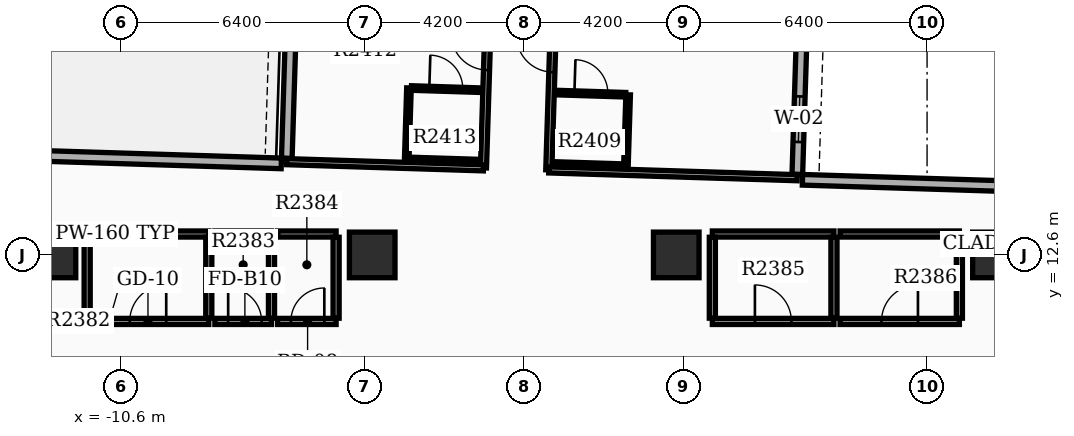
"""IFC4 building model, lengths in metres.
Left out: names, types, materials, properties, quantities, classifications, styles, units other than length and angle.
Written with IfcOpenShell. Run it as: python <this file> out.ifc"""

import sys

from ifc_helpers import new_model, si_unit, direction, frame, frame_2d, origin, origin_2d, place, context, subcontext, project, spatial, rectangle, extrude, element, fill, save


model = new_model("IFC4")
c1 = context("Model", 3, precision=1e-05, world=origin(), true_north=direction((0.0, 1.0)))
c2 = subcontext(c1, "Body", "Model", "MODEL_VIEW")
j1 = project(units=[si_unit("LENGTHUNIT", "METRE"), si_unit("PLANEANGLEUNIT", "RADIAN")], contexts=[c1])
p1 = place(None, origin())
s1 = spatial("IfcSite", under=j1, at=p1, CompositionType="ELEMENT")
p2 = place(p1, origin())
s2 = spatial("IfcBuilding", under=s1, at=p2, CompositionType="ELEMENT")
p3 = place(p2, frame((0.0, 0.0, 152.7)))
s3 = spatial("IfcBuildingStorey", under=s2, at=p3, CompositionType="ELEMENT", Elevation=152.7)
for number, where, z_axis, x_axis in (
    (1, (12.4, 12.6, 0.0), (0.0, 0.0, 1.0), (1.0, 0.0, 0.0)),
    (2, (-12.4, 12.6, 0.0), (0.0, 0.0, 1.0), (1.0, 0.0, 0.0)),
    (3, (4.0, 12.6, 0.0), (0.0, 0.0, 1.0), (1.0, 0.0, 0.0)),
    (4, (-4.0, 12.6, 0.0), (0.0, 0.0, 1.0), (1.0, 0.0, 0.0)),
):
    element("IfcColumn", number, at=place(p3, frame(where, z_axis=z_axis, x_axis=x_axis)), inside=s3, PredefinedType="COLUMN", context=c2, shape_type="SweptSolid", body=[
        extrude(rectangle(XDim=1.2, YDim=1.2, at=origin_2d()), origin(), (0.0, 0.0, 1.0), 3.9),
    ])
p4 = place(p3, frame((7.186, 14.721, 0.0), z_axis=(0.0, 0.0, 1.0), x_axis=(0.031410322165, 0.999506574096, 0.0)))
e5 = element("IfcWall", 5, at=p4, inside=s3, PredefinedType="STANDARD", context=c2, shape_type="SweptSolid", body=[
    extrude(rectangle(XDim=20.1, YDim=0.28, at=frame_2d((10.05, 0.0))), origin(), (0.0, 0.0, 1.0), 2.97),
])
p5 = place(p4, frame((0.85, 0.0, 0.8)))
e6 = element("IfcOpeningElement", 6, at=p5, cuts=e5, PredefinedType="OPENING", context=c2, shape_type="SweptSolid", body=[
    extrude(rectangle(XDim=1.2, YDim=1.6, at=frame_2d((0.6, 0.8))), frame((0.0, 0.15, 0.0), z_axis=(0.0, -1.0, 0.0), x_axis=(1.0, 0.0, 0.0)), (0.0, 0.0, 1.0), 0.3),
])
p6 = place(p4, frame((4.05, 0.0, 0.8)))
e7 = element("IfcOpeningElement", 7, at=p6, cuts=e5, PredefinedType="OPENING", context=c2, shape_type="SweptSolid", body=[
    extrude(rectangle(XDim=1.2, YDim=1.6, at=frame_2d((0.6, 0.8))), frame((0.0, 0.15, 0.0), z_axis=(0.0, -1.0, 0.0), x_axis=(1.0, 0.0, 0.0)), (0.0, 0.0, 1.0), 0.3),
])
p7 = place(p4, frame((7.25, 0.0, 0.8)))
e8 = element("IfcOpeningElement", 8, at=p7, cuts=e5, PredefinedType="OPENING", context=c2, shape_type="SweptSolid", body=[
    extrude(rectangle(XDim=1.2, YDim=1.6, at=frame_2d((0.6, 0.8))), frame((0.0, 0.15, 0.0), z_axis=(0.0, -1.0, 0.0), x_axis=(1.0, 0.0, 0.0)), (0.0, 0.0, 1.0), 0.3),
])
p8 = place(p4, frame((10.45, 0.0, 0.8)))
e9 = element("IfcOpeningElement", 9, at=p8, cuts=e5, PredefinedType="OPENING", context=c2, shape_type="SweptSolid", body=[
    extrude(rectangle(XDim=1.2, YDim=1.6, at=frame_2d((0.6, 0.8))), frame((0.0, 0.15, 0.0), z_axis=(0.0, -1.0, 0.0), x_axis=(1.0, 0.0, 0.0)), (0.0, 0.0, 1.0), 0.3),
])
p9 = place(p3, frame((-5.616, 35.234, 0.0), z_axis=(0.0, 0.0, 1.0), x_axis=(-0.031398187845, -0.999506955354, 0.0)))
e10 = element("IfcWall", 10, at=p9, inside=s3, PredefinedType="STANDARD", context=c2, shape_type="SweptSolid", body=[
    extrude(rectangle(XDim=20.1, YDim=0.28, at=frame_2d((10.05, 0.0))), origin(), (0.0, 0.0, 1.0), 2.97),
])
p10 = place(p9, frame((0.85, 0.0, 0.8)))
e11 = element("IfcOpeningElement", 11, at=p10, cuts=e10, PredefinedType="OPENING", context=c2, shape_type="SweptSolid", body=[
    extrude(rectangle(XDim=1.2, YDim=1.6, at=frame_2d((0.6, 0.8))), frame((0.0, 0.15, 0.0), z_axis=(0.0, -1.0, 0.0), x_axis=(1.0, 0.0, 0.0)), (0.0, 0.0, 1.0), 0.3),
])
p11 = place(p9, frame((4.05, 0.0, 0.8)))
e12 = element("IfcOpeningElement", 12, at=p11, cuts=e10, PredefinedType="OPENING", context=c2, shape_type="SweptSolid", body=[
    extrude(rectangle(XDim=1.2, YDim=1.6, at=frame_2d((0.6, 0.8))), frame((0.0, 0.15, 0.0), z_axis=(0.0, -1.0, 0.0), x_axis=(1.0, 0.0, 0.0)), (0.0, 0.0, 1.0), 0.3),
])
p12 = place(p9, frame((7.25, 0.0, 0.8)))
e13 = element("IfcOpeningElement", 13, at=p12, cuts=e10, PredefinedType="OPENING", context=c2, shape_type="SweptSolid", body=[
    extrude(rectangle(XDim=1.2, YDim=1.6, at=frame_2d((0.6, 0.8))), frame((0.0, 0.15, 0.0), z_axis=(0.0, -1.0, 0.0), x_axis=(1.0, 0.0, 0.0)), (0.0, 0.0, 1.0), 0.3),
])
p13 = place(p9, frame((10.95, 0.0, 0.8)))
e14 = element("IfcOpeningElement", 14, at=p13, cuts=e10, PredefinedType="OPENING", context=c2, shape_type="SweptSolid", body=[
    extrude(rectangle(XDim=1.2, YDim=1.6, at=frame_2d((0.6, 0.8))), frame((0.0, 0.15, 0.0), z_axis=(0.0, -1.0, 0.0), x_axis=(1.0, 0.0, 0.0)), (0.0, 0.0, 1.0), 0.3),
])
p14 = place(p9, frame((15.0, 0.0, 0.0)))
e15 = element("IfcOpeningElement", 15, at=p14, cuts=e10, PredefinedType="OPENING", context=c2, shape_type="SweptSolid", body=[
    extrude(rectangle(XDim=0.96, YDim=2.1, at=frame_2d((0.48, 1.05))), frame((0.0, 0.15, 0.0), z_axis=(0.0, -1.0, 0.0), x_axis=(1.0, 0.0, 0.0)), (0.0, 0.0, 1.0), 0.3),
])
p15 = place(p3, frame((13.618, 14.379, 0.0), z_axis=(0.0, 0.0, 1.0), x_axis=(-0.999507224741, 0.031389611199, 0.0)))
e16 = element("IfcWall", 16, at=p15, inside=s3, PredefinedType="STANDARD", context=c2, shape_type="SweptSolid", body=[
    extrude(rectangle(XDim=6.3, YDim=0.28, at=frame_2d((3.15, 0.0))), origin(), (0.0, 0.0, 1.0), 2.97),
])
p16 = place(p3, frame((-12.689, 15.206, 0.0), z_axis=(0.0, 0.0, 1.0), x_axis=(0.999507262922, -0.031388395416, 0.0)))
e17 = element("IfcWall", 17, at=p16, inside=s3, PredefinedType="STANDARD", context=c2, shape_type="SweptSolid", body=[
    extrude(rectangle(XDim=6.3, YDim=0.28, at=frame_2d((3.15, 0.0))), origin(), (0.0, 0.0, 1.0), 2.97),
])
p17 = place(p3, frame((-11.5, 10.85, 0.0), z_axis=(0.0, 0.0, 1.0), x_axis=(1.0, 0.0, 0.0)))
e18 = element("IfcWall", 18, at=p17, inside=s3, PredefinedType="PARTITIONING", context=c2, shape_type="SweptSolid", body=[
    extrude(rectangle(XDim=3.2, YDim=0.16, at=frame_2d((1.6, 0.0))), origin(), (0.0, 0.0, 1.0), 2.96),
])
p18 = place(p17, frame((1.12, 0.0, 0.0)))
e19 = element("IfcOpeningElement", 19, at=p18, cuts=e18, PredefinedType="OPENING", context=c2, shape_type="SweptSolid", body=[
    extrude(rectangle(XDim=0.96, YDim=2.15, at=frame_2d((0.48, 1.075))), frame((0.0, 0.09, 0.0), z_axis=(0.0, -1.0, 0.0), x_axis=(1.0, 0.0, 0.0)), (0.0, 0.0, 1.0), 0.18),
])
p19 = place(p3, frame((-11.5, 13.15, 0.0), z_axis=(0.0, 0.0, 1.0), x_axis=(1.0, 0.0, 0.0)))
e20 = element("IfcWall", 20, at=p19, inside=s3, PredefinedType="PARTITIONING", context=c2, shape_type="SweptSolid", body=[
    extrude(rectangle(XDim=3.2, YDim=0.16, at=frame_2d((1.6, 0.0))), origin(), (0.0, 0.0, 1.0), 2.96),
])
for number, where, z_axis, x_axis in (
    (21, (-11.5, 10.935, 0.0), (0.0, 0.0, 1.0), (0.0, 1.0, 0.0)),
    (22, (-8.3, 10.935, 0.0), (0.0, 0.0, 1.0), (0.0, 1.0, 0.0)),
):
    element("IfcWall", number, at=place(p3, frame(where, z_axis=z_axis, x_axis=x_axis)), inside=s3, PredefinedType="PARTITIONING", context=c2, shape_type="SweptSolid", body=[
        extrude(rectangle(XDim=2.13, YDim=0.16, at=frame_2d((1.065, 0.0))), origin(), (0.0, 0.0, 1.0), 2.96),
    ])
p20 = place(p3, frame((-8.14, 10.85, 0.0), z_axis=(0.0, 0.0, 1.0), x_axis=(1.0, 0.0, 0.0)))
e23 = element("IfcWall", 23, at=p20, inside=s3, PredefinedType="PARTITIONING", context=c2, shape_type="SweptSolid", body=[
    extrude(rectangle(XDim=1.49, YDim=0.16, at=frame_2d((0.745, 0.0))), origin(), (0.0, 0.0, 1.0), 2.96),
])
p21 = place(p20, frame((0.35, 0.0, 0.0)))
e24 = element("IfcOpeningElement", 24, at=p21, cuts=e23, PredefinedType="OPENING", context=c2, shape_type="SweptSolid", body=[
    extrude(rectangle(XDim=0.88, YDim=2.1, at=frame_2d((0.44, 1.05))), frame((0.0, 0.09, 0.0), z_axis=(0.0, -1.0, 0.0), x_axis=(1.0, 0.0, 0.0)), (0.0, 0.0, 1.0), 0.18),
])
p22 = place(p3, frame((-8.14, 13.15, 0.0), z_axis=(0.0, 0.0, 1.0), x_axis=(1.0, 0.0, 0.0)))
e25 = element("IfcWall", 25, at=p22, inside=s3, PredefinedType="PARTITIONING", context=c2, shape_type="SweptSolid", body=[
    extrude(rectangle(XDim=1.49, YDim=0.16, at=frame_2d((0.745, 0.0))), origin(), (0.0, 0.0, 1.0), 2.96),
])
p23 = place(p3, frame((-6.65, 10.935, 0.0), z_axis=(0.0, 0.0, 1.0), x_axis=(0.0, 1.0, 0.0)))
e26 = element("IfcWall", 26, at=p23, inside=s3, PredefinedType="PARTITIONING", context=c2, shape_type="SweptSolid", body=[
    extrude(rectangle(XDim=2.13, YDim=0.16, at=frame_2d((1.065, 0.0))), origin(), (0.0, 0.0, 1.0), 2.96),
])
p24 = place(p3, frame((-6.49, 10.85, 0.0), z_axis=(0.0, 0.0, 1.0), x_axis=(1.0, 0.0, 0.0)))
e27 = element("IfcWall", 27, at=p24, inside=s3, PredefinedType="PARTITIONING", context=c2, shape_type="SweptSolid", body=[
    extrude(rectangle(XDim=1.54, YDim=0.16, at=frame_2d((0.77, 0.0))), origin(), (0.0, 0.0, 1.0), 2.96),
])
p25 = place(p24, frame((0.35, 0.0, 0.0)))
e28 = element("IfcOpeningElement", 28, at=p25, cuts=e27, PredefinedType="OPENING", context=c2, shape_type="SweptSolid", body=[
    extrude(rectangle(XDim=0.88, YDim=2.15, at=frame_2d((0.44, 1.075))), frame((0.0, 0.09, 0.0), z_axis=(0.0, -1.0, 0.0), x_axis=(1.0, 0.0, 0.0)), (0.0, 0.0, 1.0), 0.18),
])
p26 = place(p3, frame((-6.49, 13.15, 0.0), z_axis=(0.0, 0.0, 1.0), x_axis=(1.0, 0.0, 0.0)))
e29 = element("IfcWall", 29, at=p26, inside=s3, PredefinedType="PARTITIONING", context=c2, shape_type="SweptSolid", body=[
    extrude(rectangle(XDim=1.54, YDim=0.16, at=frame_2d((0.77, 0.0))), origin(), (0.0, 0.0, 1.0), 2.96),
])
p27 = place(p3, frame((-4.95, 10.935, 0.0), z_axis=(0.0, 0.0, 1.0), x_axis=(0.0, 1.0, 0.0)))
e30 = element("IfcWall", 30, at=p27, inside=s3, PredefinedType="PARTITIONING", context=c2, shape_type="SweptSolid", body=[
    extrude(rectangle(XDim=2.13, YDim=0.16, at=frame_2d((1.065, 0.0))), origin(), (0.0, 0.0, 1.0), 2.96),
])
p28 = place(p3, frame((4.95, 10.85, 0.0), z_axis=(0.0, 0.0, 1.0), x_axis=(1.0, 0.0, 0.0)))
e31 = element("IfcWall", 31, at=p28, inside=s3, PredefinedType="PARTITIONING", context=c2, shape_type="SweptSolid", body=[
    extrude(rectangle(XDim=3.2, YDim=0.16, at=frame_2d((1.6, 0.0))), origin(), (0.0, 0.0, 1.0), 2.96),
])
p29 = place(p28, frame((1.12, 0.0, 0.0)))
e32 = element("IfcOpeningElement", 32, at=p29, cuts=e31, PredefinedType="OPENING", context=c2, shape_type="SweptSolid", body=[
    extrude(rectangle(XDim=0.96, YDim=2.15, at=frame_2d((0.48, 1.075))), frame((0.0, 0.09, 0.0), z_axis=(0.0, -1.0, 0.0), x_axis=(1.0, 0.0, 0.0)), (0.0, 0.0, 1.0), 0.18),
])
p30 = place(p3, frame((4.95, 13.15, 0.0), z_axis=(0.0, 0.0, 1.0), x_axis=(1.0, 0.0, 0.0)))
e33 = element("IfcWall", 33, at=p30, inside=s3, PredefinedType="PARTITIONING", context=c2, shape_type="SweptSolid", body=[
    extrude(rectangle(XDim=3.2, YDim=0.16, at=frame_2d((1.6, 0.0))), origin(), (0.0, 0.0, 1.0), 2.96),
])
for number, where, z_axis, x_axis in (
    (34, (4.95, 10.935, 0.0), (0.0, 0.0, 1.0), (0.0, 1.0, 0.0)),
    (35, (8.15, 10.935, 0.0), (0.0, 0.0, 1.0), (0.0, 1.0, 0.0)),
):
    element("IfcWall", number, at=place(p3, frame(where, z_axis=z_axis, x_axis=x_axis)), inside=s3, PredefinedType="PARTITIONING", context=c2, shape_type="SweptSolid", body=[
        extrude(rectangle(XDim=2.13, YDim=0.16, at=frame_2d((1.065, 0.0))), origin(), (0.0, 0.0, 1.0), 2.96),
    ])
p31 = place(p3, frame((8.31, 10.85, 0.0), z_axis=(0.0, 0.0, 1.0), x_axis=(1.0, 0.0, 0.0)))
e36 = element("IfcWall", 36, at=p31, inside=s3, PredefinedType="PARTITIONING", context=c2, shape_type="SweptSolid", body=[
    extrude(rectangle(XDim=3.14, YDim=0.16, at=frame_2d((1.57, 0.0))), origin(), (0.0, 0.0, 1.0), 2.96),
])
p32 = place(p31, frame((1.09, 0.0, 0.0)))
e37 = element("IfcOpeningElement", 37, at=p32, cuts=e36, PredefinedType="OPENING", context=c2, shape_type="SweptSolid", body=[
    extrude(rectangle(XDim=0.96, YDim=2.15, at=frame_2d((0.48, 1.075))), frame((0.0, 0.09, 0.0), z_axis=(0.0, -1.0, 0.0), x_axis=(1.0, 0.0, 0.0)), (0.0, 0.0, 1.0), 0.18),
])
p33 = place(p3, frame((8.31, 13.15, 0.0), z_axis=(0.0, 0.0, 1.0), x_axis=(1.0, 0.0, 0.0)))
e38 = element("IfcWall", 38, at=p33, inside=s3, PredefinedType="PARTITIONING", context=c2, shape_type="SweptSolid", body=[
    extrude(rectangle(XDim=3.14, YDim=0.16, at=frame_2d((1.57, 0.0))), origin(), (0.0, 0.0, 1.0), 2.96),
])
p34 = place(p3, frame((11.45, 10.935, 0.0), z_axis=(0.0, 0.0, 1.0), x_axis=(0.0, 1.0, 0.0)))
e39 = element("IfcWall", 39, at=p34, inside=s3, PredefinedType="PARTITIONING", context=c2, shape_type="SweptSolid", body=[
    extrude(rectangle(XDim=2.13, YDim=0.16, at=frame_2d((1.065, 0.0))), origin(), (0.0, 0.0, 1.0), 2.96),
])
p35 = place(p3, frame((0.646, 14.837, 0.0), z_axis=(0.0, 0.0, 1.0), x_axis=(0.031385618091, 0.999507350137, 0.0)))
e40 = element("IfcWall", 40, at=p35, inside=s3, PredefinedType="PARTITIONING", context=c2, shape_type="SweptSolid", body=[
    extrude(rectangle(XDim=9.7, YDim=0.16, at=frame_2d((4.85, 0.0))), origin(), (0.0, 0.0, 1.0), 2.96),
])
p36 = place(p35, frame((2.575, 0.0, 0.0)))
e41 = element("IfcOpeningElement", 41, at=p36, cuts=e40, PredefinedType="OPENING", context=c2, shape_type="SweptSolid", body=[
    extrude(rectangle(XDim=0.96, YDim=2.15, at=frame_2d((0.48, 1.075))), frame((0.0, 0.09, 0.0), z_axis=(0.0, -1.0, 0.0), x_axis=(1.0, 0.0, 0.0)), (0.0, 0.0, 1.0), 0.18),
])
p37 = place(p35, frame((8.097, 0.0, 0.0)))
e42 = element("IfcOpeningElement", 42, at=p37, cuts=e40, PredefinedType="OPENING", context=c2, shape_type="SweptSolid", body=[
    extrude(rectangle(XDim=0.96, YDim=2.15, at=frame_2d((0.48, 1.075))), frame((0.0, 0.09, 0.0), z_axis=(0.0, -1.0, 0.0), x_axis=(1.0, 0.0, 0.0)), (0.0, 0.0, 1.0), 0.18),
])
p38 = place(p3, frame((0.646, 14.837, 0.0), z_axis=(0.0, 0.0, 1.0), x_axis=(0.999507037085, -0.031395585949, 0.0)))
e43 = element("IfcWall", 43, at=p38, inside=s3, PredefinedType="PARTITIONING", context=c2, shape_type="SweptSolid", body=[
    extrude(rectangle(XDim=6.54, YDim=0.16, at=frame_2d((3.27, 0.0))), origin(), (0.0, 0.0, 1.0), 2.96),
])
p39 = place(p3, frame((0.85, 16.872, 0.0), z_axis=(0.0, 0.0, 1.0), x_axis=(0.999507221803, -0.031389704724, 0.0)))
e44 = element("IfcWall", 44, at=p39, inside=s3, PredefinedType="PARTITIONING", context=c2, shape_type="SweptSolid", body=[
    extrude(rectangle(XDim=1.82, YDim=0.12, at=frame_2d((0.91, 0.0))), origin(), (0.0, 0.0, 1.0), 2.96),
])
p40 = place(p39, frame((0.47, 0.0, 0.0)))
e45 = element("IfcOpeningElement", 45, at=p40, cuts=e44, PredefinedType="OPENING", context=c2, shape_type="SweptSolid", body=[
    extrude(rectangle(XDim=0.88, YDim=2.1, at=frame_2d((0.44, 1.05))), frame((0.0, 0.07, 0.0), z_axis=(0.0, -1.0, 0.0), x_axis=(1.0, 0.0, 0.0)), (0.0, 0.0, 1.0), 0.14),
])
p41 = place(p3, frame((0.791, 14.992, 0.0), z_axis=(0.0, 0.0, 1.0), x_axis=(0.999507221803, -0.031389704724, 0.0)))
e46 = element("IfcWall", 46, at=p41, inside=s3, PredefinedType="PARTITIONING", context=c2, shape_type="SweptSolid", body=[
    extrude(rectangle(XDim=1.82, YDim=0.12, at=frame_2d((0.91, 0.0))), origin(), (0.0, 0.0, 1.0), 2.96),
])
p42 = place(p3, frame((2.675, 14.933, 0.0), z_axis=(0.0, 0.0, 1.0), x_axis=(0.031425292588, 0.999506103526, 0.0)))
e47 = element("IfcWall", 47, at=p42, inside=s3, PredefinedType="PARTITIONING", context=c2, shape_type="SweptSolid", body=[
    extrude(rectangle(XDim=1.88, YDim=0.12, at=frame_2d((0.94, 0.0))), origin(), (0.0, 0.0, 1.0), 2.96),
])
p43 = place(p3, frame((-1.073, 14.891, 0.0), z_axis=(0.0, 0.0, 1.0), x_axis=(0.031411552371, 0.999506535435, 0.0)))
e48 = element("IfcWall", 48, at=p43, inside=s3, PredefinedType="PARTITIONING", context=c2, shape_type="SweptSolid", body=[
    extrude(rectangle(XDim=9.7, YDim=0.16, at=frame_2d((4.85, 0.0))), origin(), (0.0, 0.0, 1.0), 2.96),
])
p44 = place(p43, frame((2.575, 0.0, 0.0)))
e49 = element("IfcOpeningElement", 49, at=p44, cuts=e48, PredefinedType="OPENING", context=c2, shape_type="SweptSolid", body=[
    extrude(rectangle(XDim=0.96, YDim=2.15, at=frame_2d((0.48, 1.075))), frame((0.0, 0.09, 0.0), z_axis=(0.0, -1.0, 0.0), x_axis=(1.0, 0.0, 0.0)), (0.0, 0.0, 1.0), 0.18),
])
p45 = place(p43, frame((8.097, 0.0, 0.0)))
e50 = element("IfcOpeningElement", 50, at=p45, cuts=e48, PredefinedType="OPENING", context=c2, shape_type="SweptSolid", body=[
    extrude(rectangle(XDim=0.96, YDim=2.15, at=frame_2d((0.48, 1.075))), frame((0.0, 0.09, 0.0), z_axis=(0.0, -1.0, 0.0), x_axis=(1.0, 0.0, 0.0)), (0.0, 0.0, 1.0), 0.18),
])
p46 = place(p3, frame((-1.073, 14.891, 0.0), z_axis=(0.0, 0.0, 1.0), x_axis=(-0.999507236092, 0.03138924974, 0.0)))
e51 = element("IfcWall", 51, at=p46, inside=s3, PredefinedType="PARTITIONING", context=c2, shape_type="SweptSolid", body=[
    extrude(rectangle(XDim=5.18, YDim=0.16, at=frame_2d((2.59, 0.0))), origin(), (0.0, 0.0, 1.0), 2.96),
])
p47 = place(p3, frame((-2.968, 16.992, 0.0), z_axis=(0.0, 0.0, 1.0), x_axis=(0.999503004171, -0.03152371574, 0.0)))
e52 = element("IfcWall", 52, at=p47, inside=s3, PredefinedType="PARTITIONING", context=c2, shape_type="SweptSolid", body=[
    extrude(rectangle(XDim=1.82, YDim=0.12, at=frame_2d((0.91, 0.0))), origin(), (0.0, 0.0, 1.0), 2.96),
])
p48 = place(p47, frame((0.47, 0.0, 0.0)))
e53 = element("IfcOpeningElement", 53, at=p48, cuts=e52, PredefinedType="OPENING", context=c2, shape_type="SweptSolid", body=[
    extrude(rectangle(XDim=0.88, YDim=2.1, at=frame_2d((0.44, 1.05))), frame((0.0, 0.07, 0.0), z_axis=(0.0, -1.0, 0.0), x_axis=(1.0, 0.0, 0.0)), (0.0, 0.0, 1.0), 0.14),
])
p49 = place(p3, frame((-3.027, 15.113, 0.0), z_axis=(0.0, 0.0, 1.0), x_axis=(0.999507221803, -0.031389704724, 0.0)))
e54 = element("IfcWall", 54, at=p49, inside=s3, PredefinedType="PARTITIONING", context=c2, shape_type="SweptSolid", body=[
    extrude(rectangle(XDim=1.82, YDim=0.12, at=frame_2d((0.91, 0.0))), origin(), (0.0, 0.0, 1.0), 2.96),
])
p50 = place(p3, frame((-3.092, 15.115, 0.0), z_axis=(0.0, 0.0, 1.0), x_axis=(0.031425292588, 0.999506103526, 0.0)))
e55 = element("IfcWall", 55, at=p50, inside=s3, PredefinedType="PARTITIONING", context=c2, shape_type="SweptSolid", body=[
    extrude(rectangle(XDim=1.88, YDim=0.12, at=frame_2d((0.94, 0.0))), origin(), (0.0, 0.0, 1.0), 2.96),
])
p51 = place(p5, origin())
e56 = element("IfcWindow", 56, at=p51, inside=s3, PartitioningType="SINGLE_PANEL", PredefinedType="WINDOW", context=c2, shape_type="SweptSolid", body=[
    extrude(rectangle(XDim=1.2, YDim=1.6, at=frame_2d((0.6, 0.8))), frame((0.0, 0.03, 0.0), z_axis=(0.0, -1.0, 0.0), x_axis=(1.0, 0.0, 0.0)), (0.0, 0.0, 1.0), 0.06),
])
fill(e6, e56)
p52 = place(p18, origin())
e57 = element("IfcDoor", 57, at=p52, inside=s3, OperationType="SINGLE_SWING_RIGHT", PredefinedType="DOOR", context=c2, shape_type="SweptSolid", body=[
    extrude(rectangle(XDim=0.96, YDim=2.15, at=frame_2d((0.48, 1.075))), frame((0.0, 0.025, 0.0), z_axis=(0.0, -1.0, 0.0), x_axis=(1.0, 0.0, 0.0)), (0.0, 0.0, 1.0), 0.05),
])
fill(e19, e57)
p53 = place(p21, origin())
e58 = element("IfcDoor", 58, at=p53, inside=s3, OperationType="SINGLE_SWING_LEFT", PredefinedType="DOOR", context=c2, shape_type="SweptSolid", body=[
    extrude(rectangle(XDim=0.88, YDim=2.1, at=frame_2d((0.44, 1.05))), frame((0.0, 0.025, 0.0), z_axis=(0.0, -1.0, 0.0), x_axis=(1.0, 0.0, 0.0)), (0.0, 0.0, 1.0), 0.05),
])
fill(e24, e58)
p54 = place(p25, origin())
e59 = element("IfcDoor", 59, at=p54, inside=s3, OperationType="SINGLE_SWING_RIGHT", PredefinedType="DOOR", context=c2, shape_type="SweptSolid", body=[
    extrude(rectangle(XDim=0.88, YDim=2.15, at=frame_2d((0.44, 1.075))), frame((0.0, 0.025, 0.0), z_axis=(0.0, -1.0, 0.0), x_axis=(1.0, 0.0, 0.0)), (0.0, 0.0, 1.0), 0.05),
])
fill(e28, e59)
p55 = place(p29, origin())
e60 = element("IfcDoor", 60, at=p55, inside=s3, OperationType="SINGLE_SWING_LEFT", PredefinedType="DOOR", context=c2, shape_type="SweptSolid", body=[
    extrude(rectangle(XDim=0.96, YDim=2.15, at=frame_2d((0.48, 1.075))), frame((0.0, 0.025, 0.0), z_axis=(0.0, -1.0, 0.0), x_axis=(1.0, 0.0, 0.0)), (0.0, 0.0, 1.0), 0.05),
])
fill(e32, e60)
p56 = place(p32, origin())
e61 = element("IfcDoor", 61, at=p56, inside=s3, OperationType="SINGLE_SWING_RIGHT", PredefinedType="DOOR", context=c2, shape_type="SweptSolid", body=[
    extrude(rectangle(XDim=0.96, YDim=2.15, at=frame_2d((0.48, 1.075))), frame((0.0, 0.025, 0.0), z_axis=(0.0, -1.0, 0.0), x_axis=(1.0, 0.0, 0.0)), (0.0, 0.0, 1.0), 0.05),
])
fill(e37, e61)
p57 = place(p36, origin())
e62 = element("IfcDoor", 62, at=p57, inside=s3, OperationType="SINGLE_SWING_RIGHT", PredefinedType="DOOR", context=c2, shape_type="SweptSolid", body=[
    extrude(rectangle(XDim=0.96, YDim=2.15, at=frame_2d((0.48, 1.075))), frame((0.0, 0.025, 0.0), z_axis=(0.0, -1.0, 0.0), x_axis=(1.0, 0.0, 0.0)), (0.0, 0.0, 1.0), 0.05),
])
fill(e41, e62)
p58 = place(p40, origin())
e63 = element("IfcDoor", 63, at=p58, inside=s3, OperationType="SINGLE_SWING_LEFT", PredefinedType="DOOR", context=c2, shape_type="SweptSolid", body=[
    extrude(rectangle(XDim=0.88, YDim=2.1, at=frame_2d((0.44, 1.05))), frame((0.0, 0.025, 0.0), z_axis=(0.0, -1.0, 0.0), x_axis=(1.0, 0.0, 0.0)), (0.0, 0.0, 1.0), 0.05),
])
fill(e45, e63)
p59 = place(p44, origin())
e64 = element("IfcDoor", 64, at=p59, inside=s3, OperationType="SINGLE_SWING_RIGHT", PredefinedType="DOOR", context=c2, shape_type="SweptSolid", body=[
    extrude(rectangle(XDim=0.96, YDim=2.15, at=frame_2d((0.48, 1.075))), frame((0.0, 0.025, 0.0), z_axis=(0.0, -1.0, 0.0), x_axis=(1.0, 0.0, 0.0)), (0.0, 0.0, 1.0), 0.05),
])
fill(e49, e64)
p60 = place(p48, origin())
e65 = element("IfcDoor", 65, at=p60, inside=s3, OperationType="SINGLE_SWING_LEFT", PredefinedType="DOOR", context=c2, shape_type="SweptSolid", body=[
    extrude(rectangle(XDim=0.88, YDim=2.1, at=frame_2d((0.44, 1.05))), frame((0.0, 0.025, 0.0), z_axis=(0.0, -1.0, 0.0), x_axis=(1.0, 0.0, 0.0)), (0.0, 0.0, 1.0), 0.05),
])
fill(e53, e65)
save(model, sys.argv[1])
